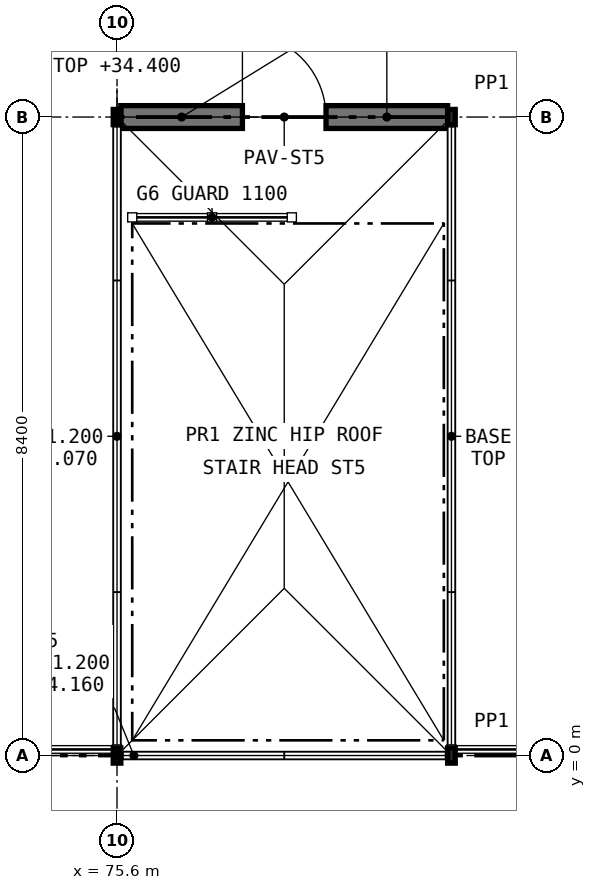
"""IFC4 building model, lengths in metres.
Left out: names, types, materials, properties, quantities, classifications, styles, units other than length and angle.
Written with IfcOpenShell. Run it as: python <this file> out.ifc"""

import sys

from ifc_helpers import new_model, si_unit, direction, frame, frame_2d, origin, origin_2d, place, context, subcontext, project, spatial, rectangle, hollow_rectangle, extrude, element, fill, save


model = new_model("IFC4")
c1 = context("Model", 3, precision=1e-05, world=origin(), true_north=direction((0.0, 1.0)))
c2 = subcontext(c1, "Body", "Model", "MODEL_VIEW")
j1 = project(units=[si_unit("LENGTHUNIT", "METRE"), si_unit("PLANEANGLEUNIT", "RADIAN")], contexts=[c1])
p1 = place(None, origin())
s1 = spatial("IfcSite", under=j1, at=p1, CompositionType="ELEMENT")
p2 = place(p1, origin())
s2 = spatial("IfcBuilding", under=s1, at=p2, CompositionType="ELEMENT")
p3 = place(p2, frame((0.0, 0.0, 31.2)))
s3 = spatial("IfcBuildingStorey", under=s2, at=p3, CompositionType="ELEMENT", Elevation=31.2)
p4 = place(p3, frame((75.6, 0.0, 0.0), z_axis=(0.0, 0.0, 1.0), x_axis=(1.0, 0.0, 0.0)))
e1 = element("IfcColumn", 1, at=p4, inside=s3, PredefinedType="COLUMN", context=c2, shape_type="SweptSolid", body=[
    extrude(hollow_rectangle(XDim=0.1, YDim=0.2, WallThickness=0.008, at=origin_2d()), origin(), (0.0, 0.0, 1.0), 3.2),
])
p5 = place(p3, frame((80.0, 0.0, -0.2), z_axis=(0.0, 0.0, 1.0), x_axis=(1.0, 0.0, 0.0)))
e2 = element("IfcColumn", 2, at=p5, inside=s3, PredefinedType="COLUMN", context=c2, shape_type="SweptSolid", body=[
    extrude(hollow_rectangle(XDim=0.1, YDim=0.2, WallThickness=0.008, at=origin_2d()), origin(), (0.0, 0.0, 1.0), 3.4),
])
p6 = place(p3, frame((75.6, 8.4, 0.0), z_axis=(0.0, 0.0, 1.0), x_axis=(1.0, 0.0, 0.0)))
e3 = element("IfcColumn", 3, at=p6, inside=s3, PredefinedType="COLUMN", context=c2, shape_type="SweptSolid", body=[
    extrude(hollow_rectangle(XDim=0.1, YDim=0.2, WallThickness=0.008, at=origin_2d()), origin(), (0.0, 0.0, 1.0), 3.2),
])
p7 = place(p3, frame((80.0, 8.4, -0.2), z_axis=(0.0, 0.0, 1.0), x_axis=(1.0, 0.0, 0.0)))
e4 = element("IfcColumn", 4, at=p7, inside=s3, PredefinedType="COLUMN", context=c2, shape_type="SweptSolid", body=[
    extrude(hollow_rectangle(XDim=0.1, YDim=0.2, WallThickness=0.008, at=origin_2d()), origin(), (0.0, 0.0, 1.0), 3.4),
])
p8 = place(p3, frame((75.65, 8.4, 0.0), z_axis=(0.0, 0.0, 1.0), x_axis=(1.0, 0.0, 0.0)))
e5 = element("IfcWall", 5, at=p8, inside=s3, PredefinedType="STANDARD", context=c2, shape_type="SweptSolid", body=[
    extrude(rectangle(XDim=4.3, YDim=0.3, at=frame_2d((2.15, 0.0))), origin(), (0.0, 0.0, 1.0), 3.2),
])
p9 = place(p8, frame((1.6, 0.0, 0.0)))
e6 = element("IfcOpeningElement", 6, at=p9, cuts=e5, PredefinedType="OPENING", context=c2, shape_type="SweptSolid", body=[
    extrude(rectangle(XDim=1.1, YDim=2.1, at=frame_2d((0.55, 1.05))), frame((0.0, 0.16, 0.0), z_axis=(0.0, -1.0, 0.0), x_axis=(1.0, 0.0, 0.0)), (0.0, 0.0, 1.0), 0.32),
])
p10 = place(p9, origin())
e7 = element("IfcDoor", 7, at=p10, inside=s3, OperationType="SINGLE_SWING_LEFT", PredefinedType="DOOR", context=c2, shape_type="SweptSolid", body=[
    extrude(rectangle(XDim=1.1, YDim=2.1, at=frame_2d((0.55, 1.05))), frame((0.0, 0.025, 0.0), z_axis=(0.0, -1.0, 0.0), x_axis=(1.0, 0.0, 0.0)), (0.0, 0.0, 1.0), 0.05),
])
fill(e6, e7)
save(model, sys.argv[1])
